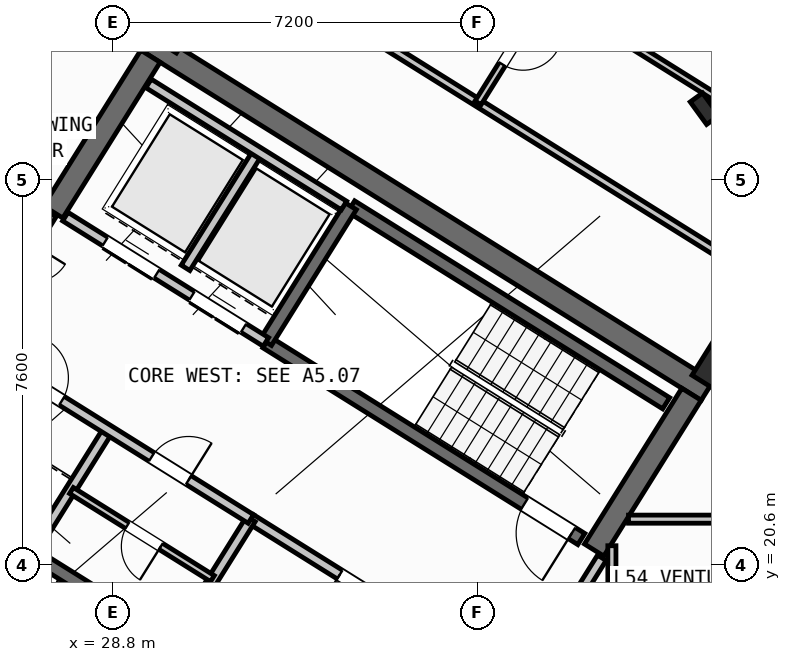
"""IFC4 building model, lengths in metres.
Left out: names, types, materials, properties, quantities, classifications, styles, units other than length and angle.
Written with IfcOpenShell. Run it as: python <this file> out.ifc"""

import sys

from ifc_helpers import new_model, si_unit, direction, frame, frame_2d, origin, origin_2d, place, context, subcontext, project, spatial, rectangle, hollow_rectangle, i_section, extrude, source, transform, mapped, element, fill, save


model = new_model("IFC4")
c1 = context("Model", 3, precision=1e-05, world=origin(), true_north=direction((0.0, 1.0)))
c2 = subcontext(c1, "Body", "Model", "MODEL_VIEW")
j1 = project(units=[si_unit("LENGTHUNIT", "METRE"), si_unit("PLANEANGLEUNIT", "RADIAN")], contexts=[c1])
p1 = place(None, origin())
s1 = spatial("IfcSite", under=j1, at=p1, CompositionType="ELEMENT")
p2 = place(p1, origin())
s2 = spatial("IfcBuilding", under=s1, at=p2, CompositionType="ELEMENT")
p3 = place(p2, frame((0.0, 0.0, 214.8)))
s3 = spatial("IfcBuildingStorey", under=s2, at=p3, CompositionType="ELEMENT", Elevation=214.8)
p4 = place(p3, frame((40.531, 24.036, 0.0), z_axis=(0.0, 0.0, 1.0), x_axis=(-0.848048787466, 0.529918157905, 0.0)))
e1 = element("IfcWall", 1, at=p4, inside=s3, PredefinedType="SHEAR", context=c2, shape_type="SweptSolid", body=[
    extrude(rectangle(XDim=13.04, YDim=0.45, at=frame_2d((6.52, 0.0))), origin(), (0.0, 0.0, 1.0), 3.35),
])
for number, where, z_axis, x_axis in (
    (2, (40.221, 23.965, 0.0), (0.0, 0.0, 1.0), (-0.53, -0.848, 0.0)),
    (3, (29.544, 30.636, 0.0), (0.0, 0.0, 1.0), (-0.53, -0.848, 0.0)),
):
    element("IfcWall", number, at=place(p3, frame(where, z_axis=z_axis, x_axis=x_axis)), inside=s3, PredefinedType="SHEAR", context=c2, shape_type="SweptSolid", body=[
        extrude(rectangle(XDim=3.625, YDim=0.45, at=frame_2d((1.812, 0.0))), origin(), (0.0, 0.0, 1.0), 3.35),
    ])
m1 = source(origin(), c2, "Body", "SweptSolid", [
    extrude(hollow_rectangle(XDim=0.8, YDim=0.8, WallThickness=0.032, at=origin_2d()), origin(), (0.0, 0.0, 1.0), 3.6),
])
for number, where, z_axis, x_axis in (
    (4, (40.783, 24.469, 0.0), (0.0, 0.0, 1.0), (-0.848, 0.53, 0.0)),
    (5, (29.928, 31.251, 0.0), (0.0, 0.0, 1.0), (-0.848, 0.53, 0.0)),
):
    element("IfcColumn", number, at=place(p3, frame(where, z_axis=z_axis, x_axis=x_axis)), inside=s3, PredefinedType="COLUMN", context=c2, shape_type="MappedRepresentation", body=[
        mapped(m1, transform((0.0, 0.0, 0.0), scale=1.0)),
    ])
m2 = source(origin(), c2, "Body", "SweptSolid", [
    extrude(i_section(OverallWidth=0.3, OverallDepth=0.55, WebThickness=0.015, FlangeThickness=0.029, at=origin_2d()), origin(), (0.0, 0.0, 1.0), 3.6),
])
p5 = place(p3, frame((40.479, 29.601, 0.0), z_axis=(0.0, 0.0, 1.0), x_axis=(0.809016994375, 0.587785252292, 0.0)))
e6 = element("IfcColumn", 6, at=p5, inside=s3, PredefinedType="COLUMN", context=c2, shape_type="MappedRepresentation", body=[
    mapped(m2, transform((0.0, 0.0, 0.0), scale=1.0)),
])
p6 = place(p3, frame((31.76, 12.183, 0.0), z_axis=(0.0, 0.0, 1.0), x_axis=(-0.848047074256, 0.529920899612, 0.0)))
e7 = element("IfcWall", 7, at=p6, inside=s3, PredefinedType="STANDARD", context=c2, shape_type="SweptSolid", body=[
    extrude(rectangle(XDim=30.652, YDim=0.32, at=frame_2d((15.326, 0.0))), origin(), (0.0, 0.0, 1.0), 3.35),
])
p7 = place(p6, frame((15.166, 0.0, 0.0)))
e8 = element("IfcOpeningElement", 8, at=p7, cuts=e7, PredefinedType="OPENING", context=c2, shape_type="SweptSolid", body=[
    extrude(rectangle(XDim=1.2, YDim=2.15, at=frame_2d((0.6, 1.075))), frame((0.0, 0.17, 0.0), z_axis=(0.0, -1.0, 0.0), x_axis=(1.0, 0.0, 0.0)), (0.0, 0.0, 1.0), 0.34),
])
p8 = place(p6, frame((2.24, 0.0, 0.9)))
e9 = element("IfcOpeningElement", 9, at=p8, cuts=e7, PredefinedType="OPENING", context=c2, shape_type="SweptSolid", body=[
    extrude(rectangle(XDim=1.65, YDim=1.45, at=frame_2d((0.825, 0.725))), frame((0.0, 0.17, 0.0), z_axis=(0.0, -1.0, 0.0), x_axis=(1.0, 0.0, 0.0)), (0.0, 0.0, 1.0), 0.34),
])
p9 = place(p6, frame((7.469, 0.0, 0.9)))
e10 = element("IfcOpeningElement", 10, at=p9, cuts=e7, PredefinedType="OPENING", context=c2, shape_type="SweptSolid", body=[
    extrude(rectangle(XDim=1.65, YDim=1.45, at=frame_2d((0.825, 0.725))), frame((0.0, 0.17, 0.0), z_axis=(0.0, -1.0, 0.0), x_axis=(1.0, 0.0, 0.0)), (0.0, 0.0, 1.0), 0.34),
])
p10 = place(p6, frame((12.623, 0.0, 1.0)))
e11 = element("IfcOpeningElement", 11, at=p10, cuts=e7, PredefinedType="OPENING", context=c2, shape_type="SweptSolid", body=[
    extrude(rectangle(XDim=0.9, YDim=1.25, at=frame_2d((0.45, 0.625))), frame((0.0, 0.17, 0.0), z_axis=(0.0, -1.0, 0.0), x_axis=(1.0, 0.0, 0.0)), (0.0, 0.0, 1.0), 0.34),
])
p11 = place(p6, frame((19.715, 0.0, 1.0)))
e12 = element("IfcOpeningElement", 12, at=p11, cuts=e7, PredefinedType="OPENING", context=c2, shape_type="SweptSolid", body=[
    extrude(rectangle(XDim=0.9, YDim=1.25, at=frame_2d((0.45, 0.625))), frame((0.0, 0.17, 0.0), z_axis=(0.0, -1.0, 0.0), x_axis=(1.0, 0.0, 0.0)), (0.0, 0.0, 1.0), 0.34),
])
p12 = place(p6, frame((25.566, 0.0, 0.9)))
e13 = element("IfcOpeningElement", 13, at=p12, cuts=e7, PredefinedType="OPENING", context=c2, shape_type="SweptSolid", body=[
    extrude(rectangle(XDim=1.65, YDim=1.45, at=frame_2d((0.825, 0.725))), frame((0.0, 0.17, 0.0), z_axis=(0.0, -1.0, 0.0), x_axis=(1.0, 0.0, 0.0)), (0.0, 0.0, 1.0), 0.34),
])
p13 = place(p6, frame((28.896, 0.0, 1.0)))
e14 = element("IfcOpeningElement", 14, at=p13, cuts=e7, PredefinedType="OPENING", context=c2, shape_type="SweptSolid", body=[
    extrude(rectangle(XDim=0.9, YDim=1.25, at=frame_2d((0.45, 0.625))), frame((0.0, 0.17, 0.0), z_axis=(0.0, -1.0, 0.0), x_axis=(1.0, 0.0, 0.0)), (0.0, 0.0, 1.0), 0.34),
])
p14 = place(p3, frame((31.28, 18.261, 0.0), z_axis=(0.0, 0.0, 1.0), x_axis=(-0.848051618787, 0.529913626805, 0.0)))
e15 = element("IfcWall", 15, at=p14, inside=s3, PredefinedType="SHEAR", context=c2, shape_type="SweptSolid", body=[
    extrude(rectangle(XDim=7.46, YDim=0.26, at=frame_2d((3.73, 0.0))), origin(), (0.0, 0.0, 1.0), 3.35),
])
p15 = place(p14, frame((0.36, 0.0, 0.0)))
e16 = element("IfcOpeningElement", 16, at=p15, cuts=e15, PredefinedType="OPENING", context=c2, shape_type="SweptSolid", body=[
    extrude(rectangle(XDim=0.86, YDim=2.05, at=frame_2d((0.43, 1.025))), frame((0.0, 0.14, 0.0), z_axis=(0.0, -1.0, 0.0), x_axis=(1.0, 0.0, 0.0)), (0.0, 0.0, 1.0), 0.28),
])
p16 = place(p3, frame((39.721, 23.788, 0.0), z_axis=(0.0, 0.0, 1.0), x_axis=(-0.848054434086, 0.529909121291, 0.0)))
e17 = element("IfcWall", 17, at=p16, inside=s3, PredefinedType="SHEAR", context=c2, shape_type="SweptSolid", body=[
    extrude(rectangle(XDim=7.33, YDim=0.26, at=frame_2d((3.665, 0.0))), origin(), (0.0, 0.0, 1.0), 3.35),
])
p17 = place(p3, frame((38.046, 21.108, 0.0), z_axis=(0.0, 0.0, 1.0), x_axis=(-0.848054434086, 0.529909121291, 0.0)))
e18 = element("IfcWall", 18, at=p17, inside=s3, PredefinedType="SHEAR", context=c2, shape_type="SweptSolid", body=[
    extrude(rectangle(XDim=7.33, YDim=0.26, at=frame_2d((3.665, 0.0))), origin(), (0.0, 0.0, 1.0), 3.35),
])
p18 = place(p17, frame((0.22, 0.0, 0.0)))
e19 = element("IfcOpeningElement", 19, at=p18, cuts=e18, PredefinedType="OPENING", context=c2, shape_type="SweptSolid", body=[
    extrude(rectangle(XDim=1.1, YDim=2.1, at=frame_2d((0.55, 1.05))), frame((0.0, 0.14, 0.0), z_axis=(0.0, -1.0, 0.0), x_axis=(1.0, 0.0, 0.0)), (0.0, 0.0, 1.0), 0.28),
])
p19 = place(p3, frame((33.496, 27.677, 0.0), z_axis=(0.0, 0.0, 1.0), x_axis=(-0.529908658664, -0.84805472316, 0.0)))
e20 = element("IfcWall", 20, at=p19, inside=s3, PredefinedType="SHEAR", context=c2, shape_type="SweptSolid", body=[
    extrude(rectangle(XDim=3.16, YDim=0.26, at=frame_2d((1.58, 0.0))), origin(), (0.0, 0.0, 1.0), 3.35),
])
p20 = place(p3, frame((36.459, 18.421, 0.0), z_axis=(0.0, 0.0, 1.0), x_axis=(-0.848059591691, 0.529900867089, 0.0)))
e21 = element("IfcWall", 21, at=p20, inside=s3, PredefinedType="STANDARD", context=c2, shape_type="SweptSolid", body=[
    extrude(rectangle(XDim=5.818, YDim=0.2, at=frame_2d((2.909, 0.0))), origin(), (0.0, 0.0, 1.0), 3.34),
])
p21 = place(p20, frame((2.598, 0.0, 0.0)))
e22 = element("IfcOpeningElement", 22, at=p21, cuts=e21, PredefinedType="OPENING", context=c2, shape_type="SweptSolid", body=[
    extrude(rectangle(XDim=1.15, YDim=2.1, at=frame_2d((0.575, 1.05))), frame((0.0, 0.11, 0.0), z_axis=(0.0, -1.0, 0.0), x_axis=(1.0, 0.0, 0.0)), (0.0, 0.0, 1.0), 0.22),
])
p22 = place(p3, frame((31.822, 24.998, 0.0), z_axis=(0.0, 0.0, 1.0), x_axis=(-0.848054125777, 0.529909614701, 0.0)))
e23 = element("IfcWall", 23, at=p22, inside=s3, PredefinedType="STANDARD", context=c2, shape_type="SweptSolid", body=[
    extrude(rectangle(XDim=4.668, YDim=0.2, at=frame_2d((2.334, 0.0))), origin(), (0.0, 0.0, 1.0), 3.34),
])
p23 = place(p22, frame((0.52, 0.0, 0.0)))
e24 = element("IfcOpeningElement", 24, at=p23, cuts=e23, PredefinedType="OPENING", context=c2, shape_type="SweptSolid", body=[
    extrude(rectangle(XDim=1.2, YDim=2.15, at=frame_2d((0.6, 1.075))), frame((0.0, 0.11, 0.0), z_axis=(0.0, -1.0, 0.0), x_axis=(1.0, 0.0, 0.0)), (0.0, 0.0, 1.0), 0.22),
])
p24 = place(p22, frame((2.54, 0.0, 0.0)))
e25 = element("IfcOpeningElement", 25, at=p24, cuts=e23, PredefinedType="OPENING", context=c2, shape_type="SweptSolid", body=[
    extrude(rectangle(XDim=1.2, YDim=2.15, at=frame_2d((0.6, 1.075))), frame((0.0, 0.11, 0.0), z_axis=(0.0, -1.0, 0.0), x_axis=(1.0, 0.0, 0.0)), (0.0, 0.0, 1.0), 0.22),
])
p25 = place(p3, frame((31.645, 28.716, 0.0), z_axis=(0.0, 0.0, 1.0), x_axis=(-0.52986693015, -0.848080795876, 0.0)))
e26 = element("IfcWall", 26, at=p25, inside=s3, PredefinedType="STANDARD", context=c2, shape_type="SweptSolid", body=[
    extrude(rectangle(XDim=2.66, YDim=0.2, at=frame_2d((1.33, 0.0))), origin(), (0.0, 0.0, 1.0), 3.34),
])
p26 = place(p3, frame((33.363, 27.69, 0.0), z_axis=(0.0, 0.0, 1.0), x_axis=(-0.84804957148, 0.529916903215, 0.0)))
e27 = element("IfcWall", 27, at=p26, inside=s3, PredefinedType="STANDARD", context=c2, shape_type="SweptSolid", body=[
    extrude(rectangle(XDim=4.548, YDim=0.2, at=frame_2d((2.274, 0.0))), origin(), (0.0, 0.0, 1.0), 3.34),
])
for number, where, z_axis, x_axis in (
    (28, (31.525, 21.504, 0.0), (0.0, 0.0, 1.0), (-0.53, -0.848, 0.0)),
    (29, (28.71, 23.263, 0.0), (0.0, 0.0, 1.0), (-0.53, -0.848, 0.0)),
):
    element("IfcWall", number, at=place(p3, frame(where, z_axis=z_axis, x_axis=x_axis)), inside=s3, PredefinedType="STANDARD", context=c2, shape_type="SweptSolid", body=[
        extrude(rectangle(XDim=2.88, YDim=0.2, at=frame_2d((1.44, 0.0))), origin(), (0.0, 0.0, 1.0), 3.34),
    ])
p27 = place(p3, frame((31.525, 21.504, 0.0), z_axis=(0.0, 0.0, 1.0), x_axis=(-0.848042066329, 0.529928913853, 0.0)))
e30 = element("IfcWall", 30, at=p27, inside=s3, PredefinedType="STANDARD", context=c2, shape_type="SweptSolid", body=[
    extrude(rectangle(XDim=6.268, YDim=0.2, at=frame_2d((3.134, 0.0))), origin(), (0.0, 0.0, 1.0), 3.34),
])
p28 = place(p27, frame((4.4, 0.0, 0.0)))
e31 = element("IfcOpeningElement", 31, at=p28, cuts=e30, PredefinedType="OPENING", context=c2, shape_type="SweptSolid", body=[
    extrude(rectangle(XDim=0.86, YDim=2.05, at=frame_2d((0.43, 1.025))), frame((0.0, 0.11, 0.0), z_axis=(0.0, -1.0, 0.0), x_axis=(1.0, 0.0, 0.0)), (0.0, 0.0, 1.0), 0.22),
])
p29 = place(p27, frame((1.45, 0.0, 0.0)))
e32 = element("IfcOpeningElement", 32, at=p29, cuts=e30, PredefinedType="OPENING", context=c2, shape_type="SweptSolid", body=[
    extrude(rectangle(XDim=0.86, YDim=2.05, at=frame_2d((0.43, 1.025))), frame((0.0, 0.11, 0.0), z_axis=(0.0, -1.0, 0.0), x_axis=(1.0, 0.0, 0.0)), (0.0, 0.0, 1.0), 0.22),
])
p30 = place(p3, frame((30.766, 20.327, 0.0), z_axis=(0.0, 0.0, 1.0), x_axis=(-0.848052663127, 0.529911955482, 0.0)))
e33 = element("IfcWall", 33, at=p30, inside=s3, PredefinedType="PLUMBINGWALL", context=c2, shape_type="SweptSolid", body=[
    extrude(rectangle(XDim=3.28, YDim=0.14, at=frame_2d((1.64, 0.0))), origin(), (0.0, 0.0, 1.0), 3.34),
])
p31 = place(p30, frame((1.2, 0.0, 0.0)))
e34 = element("IfcOpeningElement", 34, at=p31, cuts=e33, PredefinedType="OPENING", context=c2, shape_type="SweptSolid", body=[
    extrude(rectangle(XDim=0.78, YDim=2.05, at=frame_2d((0.39, 1.025))), frame((0.0, 0.08, 0.0), z_axis=(0.0, -1.0, 0.0), x_axis=(1.0, 0.0, 0.0)), (0.0, 0.0, 1.0), 0.16),
])
p32 = place(p3, frame((27.596, 27.52, 0.0), z_axis=(0.0, 0.0, 1.0), x_axis=(-0.529865479138, -0.848081702443, 0.0)))
e35 = element("IfcWall", 35, at=p32, inside=s3, PredefinedType="STANDARD", context=c2, shape_type="SweptSolid", body=[
    extrude(rectangle(XDim=2.96, YDim=0.2, at=frame_2d((1.48, 0.0))), origin(), (0.0, 0.0, 1.0), 3.34),
])
p33 = place(p32, frame((0.7, 0.0, 0.0)))
e36 = element("IfcOpeningElement", 36, at=p33, cuts=e35, PredefinedType="OPENING", context=c2, shape_type="SweptSolid", body=[
    extrude(rectangle(XDim=1.5, YDim=2.15, at=frame_2d((0.75, 1.075))), frame((0.0, 0.11, 0.0), z_axis=(0.0, -1.0, 0.0), x_axis=(1.0, 0.0, 0.0)), (0.0, 0.0, 1.0), 0.22),
])
p34 = place(p3, frame((31.239, 38.274, 0.0), z_axis=(0.0, 0.0, 1.0), x_axis=(-0.529925472745, -0.848044216616, 0.0)))
e37 = element("IfcWall", 37, at=p34, inside=s3, PredefinedType="PARTITIONING", context=c2, shape_type="SweptSolid", body=[
    extrude(rectangle(XDim=11.65, YDim=0.16, at=frame_2d((5.825, 0.0))), origin(), (0.0, 0.0, 1.0), 3.34),
])
p35 = place(p3, frame((41.936, 26.012, 0.0), z_axis=(0.0, 0.0, 1.0), x_axis=(-0.848051154596, 0.529914369676, 0.0)))
e38 = element("IfcWall", 38, at=p35, inside=s3, PredefinedType="PARTITIONING", context=c2, shape_type="SweptSolid", body=[
    extrude(rectangle(XDim=15.57, YDim=0.16, at=frame_2d((7.785, 0.0))), origin(), (0.0, 0.0, 1.0), 3.34),
])
p36 = place(p35, frame((10.83, 0.0, 0.0)))
e39 = element("IfcOpeningElement", 39, at=p36, cuts=e38, PredefinedType="OPENING", context=c2, shape_type="SweptSolid", body=[
    extrude(rectangle(XDim=1.0, YDim=2.1, at=frame_2d((0.5, 1.05))), frame((0.0, 0.09, 0.0), z_axis=(0.0, -1.0, 0.0), x_axis=(1.0, 0.0, 0.0)), (0.0, 0.0, 1.0), 0.18),
])
p37 = place(p3, frame((42.226, 28.873, 0.0), z_axis=(0.0, 0.0, 1.0), x_axis=(-0.848049134363, 0.529917602752, 0.0)))
e40 = element("IfcWall", 40, at=p37, inside=s3, PredefinedType="PLUMBINGWALL", context=c2, shape_type="SweptSolid", body=[
    extrude(rectangle(XDim=14.3, YDim=0.14, at=frame_2d((7.15, 0.0))), origin(), (0.0, 0.0, 1.0), 3.34),
])
p38 = place(p37, frame((9.57, 0.0, 0.0)))
e41 = element("IfcOpeningElement", 41, at=p38, cuts=e40, PredefinedType="OPENING", context=c2, shape_type="SweptSolid", body=[
    extrude(rectangle(XDim=0.92, YDim=2.08, at=frame_2d((0.46, 1.04))), frame((0.0, 0.08, 0.0), z_axis=(0.0, -1.0, 0.0), x_axis=(1.0, 0.0, 0.0)), (0.0, 0.0, 1.0), 0.16),
])
p39 = place(p3, frame((37.375, 31.904, 0.0), z_axis=(0.0, 0.0, 1.0), x_axis=(-0.529913878929, -0.848051461244, 0.0)))
e42 = element("IfcWall", 42, at=p39, inside=s3, PredefinedType="PLUMBINGWALL", context=c2, shape_type="SweptSolid", body=[
    extrude(rectangle(XDim=2.58, YDim=0.14, at=frame_2d((1.29, 0.0))), origin(), (0.0, 0.0, 1.0), 3.34),
])
p40 = place(p39, frame((0.9, 0.0, 0.0)))
e43 = element("IfcOpeningElement", 43, at=p40, cuts=e42, PredefinedType="OPENING", context=c2, shape_type="SweptSolid", body=[
    extrude(rectangle(XDim=0.78, YDim=2.05, at=frame_2d((0.39, 1.025))), frame((0.0, 0.08, 0.0), z_axis=(0.0, -1.0, 0.0), x_axis=(1.0, 0.0, 0.0)), (0.0, 0.0, 1.0), 0.16),
])
p41 = place(p3, frame((38.451, 20.737, 0.0), z_axis=(0.0, 0.0, 1.0), x_axis=(-0.529924799939, -0.848044637038, 0.0)))
e44 = element("IfcWall", 44, at=p41, inside=s3, PredefinedType="STANDARD", context=c2, shape_type="SweptSolid", body=[
    extrude(rectangle(XDim=2.96, YDim=0.2, at=frame_2d((1.48, 0.0))), origin(), (0.0, 0.0, 1.0), 3.34),
])
p42 = place(p41, frame((1.46, 0.0, 0.0)))
e45 = element("IfcOpeningElement", 45, at=p42, cuts=e44, PredefinedType="OPENING", context=c2, shape_type="SweptSolid", body=[
    extrude(rectangle(XDim=0.86, YDim=2.05, at=frame_2d((0.43, 1.025))), frame((0.0, 0.11, 0.0), z_axis=(0.0, -1.0, 0.0), x_axis=(1.0, 0.0, 0.0)), (0.0, 0.0, 1.0), 0.22),
])
p43 = place(p3, frame((38.65, 17.93, 0.0), z_axis=(0.0, 0.0, 1.0), x_axis=(0.0, 1.0, 0.0)))
e46 = element("IfcWall", 46, at=p43, inside=s3, PredefinedType="PARTITIONING", context=c2, shape_type="SweptSolid", body=[
    extrude(rectangle(XDim=3.046, YDim=0.16, at=frame_2d((1.523, 0.0))), origin(), (0.0, 0.0, 1.0), 3.34),
])
p44 = place(p3, frame((38.978, 21.5, 0.0), z_axis=(0.0, 0.0, 1.0), x_axis=(1.0, 0.0, 0.0)))
e47 = element("IfcWall", 47, at=p44, inside=s3, PredefinedType="PARTITIONING", context=c2, shape_type="SweptSolid", body=[
    extrude(rectangle(XDim=7.336, YDim=0.16, at=frame_2d((3.668, 0.0))), origin(), (0.0, 0.0, 1.0), 3.34),
])
m3 = source(origin(), c2, "Body", "SweptSolid", [
    extrude(rectangle(XDim=1.1, YDim=2.1, at=frame_2d((0.55, 1.05))), frame((0.0, 0.025, 0.0), z_axis=(0.0, -1.0, 0.0), x_axis=(1.0, 0.0, 0.0)), (0.0, 0.0, 1.0), 0.05),
])
p45 = place(p18, origin())
e48 = element("IfcDoor", 48, at=p45, inside=s3, OperationType="SINGLE_SWING_LEFT", PredefinedType="DOOR", context=c2, shape_type="MappedRepresentation", body=[
    mapped(m3, transform((0.0, 0.0, 0.0), scale=1.0)),
])
fill(e19, e48)
m4 = source(origin(), c2, "Body", "SweptSolid", [
    extrude(rectangle(XDim=1.15, YDim=2.1, at=frame_2d((0.575, 1.05))), frame((0.0, 0.025, 0.0), z_axis=(0.0, -1.0, 0.0), x_axis=(1.0, 0.0, 0.0)), (0.0, 0.0, 1.0), 0.05),
])
p46 = place(p21, origin())
e49 = element("IfcDoor", 49, at=p46, inside=s3, OperationType="SINGLE_SWING_RIGHT", PredefinedType="DOOR", context=c2, shape_type="MappedRepresentation", body=[
    mapped(m4, transform((0.0, 0.0, 0.0), scale=1.0)),
])
fill(e22, e49)
m5 = source(origin(), c2, "Body", "SweptSolid", [
    extrude(rectangle(XDim=1.2, YDim=2.15, at=frame_2d((0.6, 1.075))), frame((0.0, 0.025, 0.0), z_axis=(0.0, -1.0, 0.0), x_axis=(1.0, 0.0, 0.0)), (0.0, 0.0, 1.0), 0.05),
])
p47 = place(p23, origin())
e50 = element("IfcDoor", 50, at=p47, inside=s3, OperationType="DOUBLE_DOOR_SLIDING", PredefinedType="DOOR", context=c2, shape_type="MappedRepresentation", body=[
    mapped(m5, transform((0.0, 0.0, 0.0), scale=1.0)),
])
fill(e24, e50)
p48 = place(p24, origin())
e51 = element("IfcDoor", 51, at=p48, inside=s3, OperationType="DOUBLE_DOOR_SLIDING", PredefinedType="DOOR", context=c2, shape_type="MappedRepresentation", body=[
    mapped(m5, transform((0.0, 0.0, 0.0), scale=1.0)),
])
fill(e25, e51)
m6 = source(origin(), c2, "Body", "SweptSolid", [
    extrude(rectangle(XDim=0.86, YDim=2.05, at=frame_2d((0.43, 1.025))), frame((0.0, 0.025, 0.0), z_axis=(0.0, -1.0, 0.0), x_axis=(1.0, 0.0, 0.0)), (0.0, 0.0, 1.0), 0.05),
])
p49 = place(p28, frame((0.86, 0.0, 0.0), z_axis=(0.0, 0.0, 1.0), x_axis=(-1.0, 0.0, 0.0)))
e52 = element("IfcDoor", 52, at=p49, inside=s3, OperationType="SINGLE_SWING_LEFT", PredefinedType="DOOR", context=c2, shape_type="MappedRepresentation", body=[
    mapped(m6, transform((0.0, 0.0, 0.0), scale=1.0)),
])
fill(e31, e52)
p50 = place(p29, frame((0.86, 0.0, 0.0), z_axis=(0.0, 0.0, 1.0), x_axis=(-1.0, 0.0, 0.0)))
e53 = element("IfcDoor", 53, at=p50, inside=s3, OperationType="SINGLE_SWING_RIGHT", PredefinedType="DOOR", context=c2, shape_type="MappedRepresentation", body=[
    mapped(m6, transform((0.0, 0.0, 0.0), scale=1.0)),
])
fill(e32, e53)
m7 = source(origin(), c2, "Body", "SweptSolid", [
    extrude(rectangle(XDim=0.78, YDim=2.05, at=frame_2d((0.39, 1.025))), frame((0.0, 0.025, 0.0), z_axis=(0.0, -1.0, 0.0), x_axis=(1.0, 0.0, 0.0)), (0.0, 0.0, 1.0), 0.05),
])
p51 = place(p31, origin())
e54 = element("IfcDoor", 54, at=p51, inside=s3, OperationType="SINGLE_SWING_LEFT", PredefinedType="DOOR", context=c2, shape_type="MappedRepresentation", body=[
    mapped(m7, transform((0.0, 0.0, 0.0), scale=1.0)),
])
fill(e34, e54)
p52 = place(p40, origin())
e55 = element("IfcDoor", 55, at=p52, inside=s3, OperationType="SINGLE_SWING_LEFT", PredefinedType="DOOR", context=c2, shape_type="MappedRepresentation", body=[
    mapped(m7, transform((0.0, 0.0, 0.0), scale=1.0)),
])
fill(e43, e55)
save(model, sys.argv[1])
